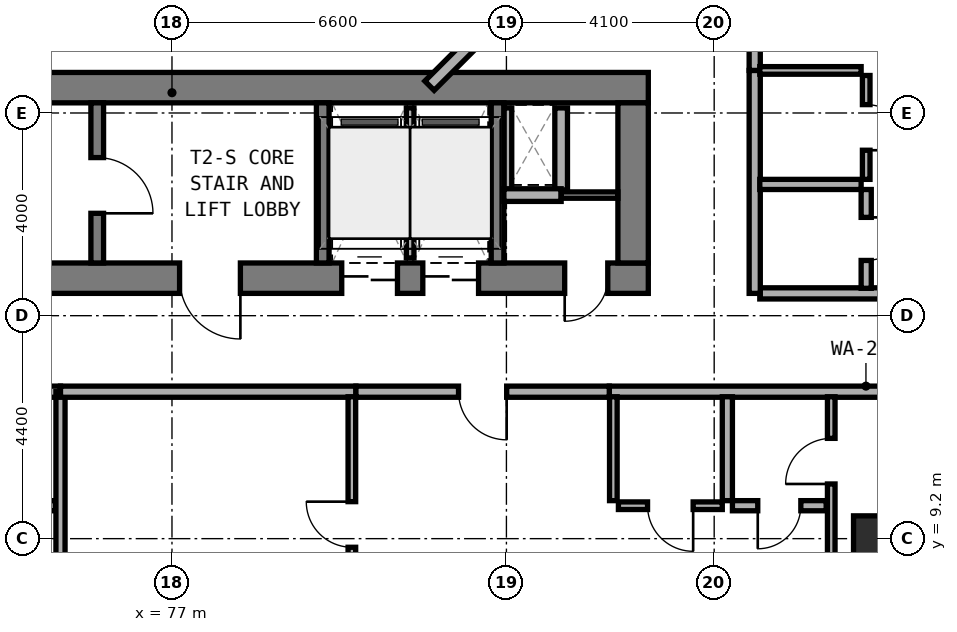
"""IFC4 building model, lengths in metres.
Left out: names, types, materials, properties, quantities, classifications, styles, units other than length and angle.
Written with IfcOpenShell. Run it as: python <this file> out.ifc"""

import sys

from ifc_helpers import new_model, si_unit, direction, frame, frame_2d, origin, origin_2d, place, context, subcontext, project, spatial, rectangle, extrude, element, fill, save


model = new_model("IFC4")
c1 = context("Model", 3, precision=1e-05, world=origin(), true_north=direction((0.0, 1.0)))
c2 = subcontext(c1, "Body", "Model", "MODEL_VIEW")
j1 = project(units=[si_unit("LENGTHUNIT", "METRE"), si_unit("PLANEANGLEUNIT", "RADIAN")], contexts=[c1])
p1 = place(None, origin())
s1 = spatial("IfcSite", under=j1, at=p1, CompositionType="ELEMENT")
p2 = place(p1, origin())
s2 = spatial("IfcBuilding", under=s1, at=p2, CompositionType="ELEMENT")
p3 = place(p2, frame((0.0, 0.0, 31.0)))
s3 = spatial("IfcBuildingStorey", under=s2, at=p3, CompositionType="ELEMENT", Elevation=31.0)
p4 = place(p3, frame((67.8, 14.34, 0.0), z_axis=(0.0, 0.0, 1.0), x_axis=(1.0, 0.0, 0.0)))
e1 = element("IfcWall", 1, at=p4, inside=s3, PredefinedType="SHEAR", context=c2, shape_type="SweptSolid", body=[
    extrude(rectangle(XDim=18.6, YDim=0.6, at=frame_2d((9.3, 0.0))), origin(), (0.0, 0.0, 1.0), 3.5),
])
p5 = place(p4, frame((9.35, 0.0, 0.0)))
e2 = element("IfcOpeningElement", 2, at=p5, cuts=e1, PredefinedType="OPENING", context=c2, shape_type="SweptSolid", body=[
    extrude(rectangle(XDim=1.2, YDim=2.15, at=frame_2d((0.6, 1.075))), frame((0.0, 0.31, 0.0), z_axis=(0.0, -1.0, 0.0), x_axis=(1.0, 0.0, 0.0)), (0.0, 0.0, 1.0), 0.62),
])
p6 = place(p4, frame((16.95, 0.0, 0.0)))
e3 = element("IfcOpeningElement", 3, at=p6, cuts=e1, PredefinedType="OPENING", context=c2, shape_type="SweptSolid", body=[
    extrude(rectangle(XDim=0.85, YDim=2.1, at=frame_2d((0.425, 1.05))), frame((0.0, 0.31, 0.0), z_axis=(0.0, -1.0, 0.0), x_axis=(1.0, 0.0, 0.0)), (0.0, 0.0, 1.0), 0.62),
])
p7 = place(p4, frame((12.55, 0.0, 0.0)))
e4 = element("IfcOpeningElement", 4, at=p7, cuts=e1, PredefinedType="OPENING", context=c2, shape_type="SweptSolid", body=[
    extrude(rectangle(XDim=1.1, YDim=2.15, at=frame_2d((0.55, 1.075))), frame((0.0, 0.31, 0.0), z_axis=(0.0, -1.0, 0.0), x_axis=(1.0, 0.0, 0.0)), (0.0, 0.0, 1.0), 0.62),
])
p8 = place(p4, frame((14.15, 0.0, 0.0)))
e5 = element("IfcOpeningElement", 5, at=p8, cuts=e1, PredefinedType="OPENING", context=c2, shape_type="SweptSolid", body=[
    extrude(rectangle(XDim=1.1, YDim=2.15, at=frame_2d((0.55, 1.075))), frame((0.0, 0.31, 0.0), z_axis=(0.0, -1.0, 0.0), x_axis=(1.0, 0.0, 0.0)), (0.0, 0.0, 1.0), 0.62),
])
p9 = place(p3, frame((67.8, 18.1, 0.0), z_axis=(0.0, 0.0, 1.0), x_axis=(1.0, 0.0, 0.0)))
e6 = element("IfcWall", 6, at=p9, inside=s3, PredefinedType="SHEAR", context=c2, shape_type="SweptSolid", body=[
    extrude(rectangle(XDim=18.6, YDim=0.6, at=frame_2d((9.3, 0.0))), origin(), (0.0, 0.0, 1.0), 3.5),
])
p10 = place(p3, frame((86.1, 14.64, 0.0), z_axis=(0.0, 0.0, 1.0), x_axis=(0.0, 1.0, 0.0)))
e7 = element("IfcWall", 7, at=p10, inside=s3, PredefinedType="SHEAR", context=c2, shape_type="SweptSolid", body=[
    extrude(rectangle(XDim=3.16, YDim=0.6, at=frame_2d((1.58, 0.0))), origin(), (0.0, 0.0, 1.0), 3.5),
])
p11 = place(p3, frame((75.525, 14.64, 0.0), z_axis=(0.0, 0.0, 1.0), x_axis=(0.0, 1.0, 0.0)))
e8 = element("IfcWall", 8, at=p11, inside=s3, PredefinedType="STANDARD", context=c2, shape_type="SweptSolid", body=[
    extrude(rectangle(XDim=3.16, YDim=0.25, at=frame_2d((1.58, 0.0))), origin(), (0.0, 0.0, 1.0), 3.25),
])
p12 = place(p11, frame((0.98, 0.0, 0.0)))
e9 = element("IfcOpeningElement", 9, at=p12, cuts=e8, PredefinedType="OPENING", context=c2, shape_type="SweptSolid", body=[
    extrude(rectangle(XDim=1.1, YDim=2.15, at=frame_2d((0.55, 1.075))), frame((0.0, 0.135, 0.0), z_axis=(0.0, -1.0, 0.0), x_axis=(1.0, 0.0, 0.0)), (0.0, 0.0, 1.0), 0.27),
])
for number, where, z_axis, x_axis in (
    (10, (79.975, 14.64, 0.0), (0.0, 0.0, 1.0), (0.0, 1.0, 0.0)),
    (11, (83.425, 14.64, 0.0), (0.0, 0.0, 1.0), (0.0, 1.0, 0.0)),
):
    element("IfcWall", number, at=place(p3, frame(where, z_axis=z_axis, x_axis=x_axis)), inside=s3, PredefinedType="STANDARD", context=c2, shape_type="SweptSolid", body=[
        extrude(rectangle(XDim=3.16, YDim=0.25, at=frame_2d((1.58, 0.0))), origin(), (0.0, 0.0, 1.0), 3.25),
    ])
p13 = place(p3, frame((91.0, 9.0, 0.0), z_axis=(0.0, 0.0, 1.0), x_axis=(1.0, 0.0, 0.0)))
e12 = element("IfcColumn", 12, at=p13, inside=s3, PredefinedType="COLUMN", context=c2, shape_type="SweptSolid", body=[
    extrude(rectangle(XDim=1.1, YDim=1.3, at=origin_2d()), origin(), (0.0, 0.0, 1.0), 3.5),
])
p14 = place(p3, frame((82.082, 18.138, 0.0), z_axis=(0.0, 0.0, 1.0), x_axis=(0.707106781187, 0.707106781187, 0.0)))
e13 = element("IfcWall", 13, at=p14, inside=s3, PredefinedType="STANDARD", context=c2, shape_type="SweptSolid", body=[
    extrude(rectangle(XDim=2.311, YDim=0.26, at=frame_2d((1.155, 0.0))), origin(), (0.0, 0.0, 1.0), 3.25),
])
p15 = place(p3, frame((83.63, 16.08, 0.0), z_axis=(0.0, 0.0, 1.0), x_axis=(0.0, 1.0, 0.0)))
e14 = element("IfcWall", 14, at=p15, inside=s3, PredefinedType="PARTITIONING", context=c2, shape_type="SweptSolid", body=[
    extrude(rectangle(XDim=1.62, YDim=0.15, at=frame_2d((0.81, 0.0))), origin(), (0.0, 0.0, 1.0), 2.725),
])
p16 = place(p3, frame((84.68, 16.08, 0.0), z_axis=(0.0, 0.0, 1.0), x_axis=(0.0, 1.0, 0.0)))
e15 = element("IfcWall", 15, at=p16, inside=s3, PredefinedType="SOLIDWALL", context=c2, shape_type="SweptSolid", body=[
    extrude(rectangle(XDim=1.62, YDim=0.25, at=frame_2d((0.81, 0.0))), origin(), (0.0, 0.0, 1.0), 3.22),
])
p17 = place(p3, frame((83.55, 15.98, 0.0), z_axis=(0.0, 0.0, 1.0), x_axis=(1.0, 0.0, 0.0)))
e16 = element("IfcWall", 16, at=p17, inside=s3, PredefinedType="SOLIDWALL", context=c2, shape_type="SweptSolid", body=[
    extrude(rectangle(XDim=1.13, YDim=0.25, at=frame_2d((0.565, 0.0))), origin(), (0.0, 0.0, 1.0), 3.22),
])
p18 = place(p3, frame((84.68, 15.98, 0.0), z_axis=(0.0, 0.0, 1.0), x_axis=(1.0, 0.0, 0.0)))
e17 = element("IfcWall", 17, at=p18, inside=s3, PredefinedType="PARTITIONING", context=c2, shape_type="SweptSolid", body=[
    extrude(rectangle(XDim=1.12, YDim=0.125, at=frame_2d((0.56, 0.0))), origin(), (0.0, 0.0, 1.0), 3.22),
])
p19 = place(p3, frame((81.7, 14.74, 0.0), z_axis=(0.0, 0.0, 1.0), x_axis=(0.0, 1.0, 0.0)))
e18 = element("IfcWall", 18, at=p19, inside=s3, PredefinedType="PARTITIONING", context=c2, shape_type="SweptSolid", body=[
    extrude(rectangle(XDim=2.96, YDim=0.15, at=frame_2d((1.48, 0.0))), origin(), (0.0, 0.0, 1.0), 3.22),
])
p20 = place(p3, frame((70.42, 12.1, 0.0), z_axis=(0.0, 0.0, 1.0), x_axis=(1.0, 0.0, 0.0)))
e19 = element("IfcWall", 19, at=p20, inside=s3, PredefinedType="SOLIDWALL", context=c2, shape_type="SweptSolid", body=[
    extrude(rectangle(XDim=4.38, YDim=0.22, at=frame_2d((2.19, 0.0))), origin(), (0.0, 0.0, 1.0), 2.725),
])
p21 = place(p3, frame((72.85, 9.85, 0.0), z_axis=(0.0, 0.0, 1.0), x_axis=(1.0, 0.0, 0.0)))
e20 = element("IfcWall", 20, at=p21, inside=s3, PredefinedType="PLUMBINGWALL", context=c2, shape_type="SweptSolid", body=[
    extrude(rectangle(XDim=1.85, YDim=0.2, at=frame_2d((0.925, 0.0))), origin(), (0.0, 0.0, 1.0), 3.22),
])
p22 = place(p21, frame((0.5, 0.0, 0.0)))
e21 = element("IfcOpeningElement", 21, at=p22, cuts=e20, PredefinedType="OPENING", context=c2, shape_type="SweptSolid", body=[
    extrude(rectangle(XDim=0.85, YDim=2.1, at=frame_2d((0.425, 1.05))), frame((0.0, 0.11, 0.0), z_axis=(0.0, -1.0, 0.0), x_axis=(1.0, 0.0, 0.0)), (0.0, 0.0, 1.0), 0.22),
])
p23 = place(p3, frame((74.8, 5.06, 0.0), z_axis=(0.0, 0.0, 1.0), x_axis=(0.0, 1.0, 0.0)))
e22 = element("IfcWall", 22, at=p23, inside=s3, PredefinedType="SOLIDWALL", context=c2, shape_type="SweptSolid", body=[
    extrude(rectangle(XDim=7.04, YDim=0.18, at=frame_2d((3.52, 0.0))), origin(), (0.0, 0.0, 1.0), 2.825),
])
p24 = place(p3, frame((74.8, 12.1, 0.0), z_axis=(0.0, 0.0, 1.0), x_axis=(1.0, 0.0, 0.0)))
e23 = element("IfcWall", 23, at=p24, inside=s3, PredefinedType="SOLIDWALL", context=c2, shape_type="SweptSolid", body=[
    extrude(rectangle(XDim=5.83, YDim=0.22, at=frame_2d((2.915, 0.0))), origin(), (0.0, 0.0, 1.0), 3.22),
])
p25 = place(p3, frame((85.63, 12.1, 0.0), z_axis=(0.0, 0.0, 1.0), x_axis=(1.0, 0.0, 0.0)))
e24 = element("IfcWall", 24, at=p25, inside=s3, PredefinedType="SOLIDWALL", context=c2, shape_type="SweptSolid", body=[
    extrude(rectangle(XDim=10.13, YDim=0.22, at=frame_2d((5.065, 0.0))), origin(), (0.0, 0.0, 1.0), 2.865),
])
p26 = place(p3, frame((80.63, 12.1, 0.0), z_axis=(0.0, 0.0, 1.0), x_axis=(1.0, 0.0, 0.0)))
e25 = element("IfcWall", 25, at=p26, inside=s3, PredefinedType="SOLIDWALL", context=c2, shape_type="SweptSolid", body=[
    extrude(rectangle(XDim=5.0, YDim=0.22, at=frame_2d((2.5, 0.0))), origin(), (0.0, 0.0, 1.0), 2.725),
])
p27 = place(p26, frame((2.025, 0.0, 0.0)))
e26 = element("IfcOpeningElement", 26, at=p27, cuts=e25, PredefinedType="OPENING", context=c2, shape_type="SweptSolid", body=[
    extrude(rectangle(XDim=0.95, YDim=2.1, at=frame_2d((0.475, 1.05))), frame((0.0, 0.12, 0.0), z_axis=(0.0, -1.0, 0.0), x_axis=(1.0, 0.0, 0.0)), (0.0, 0.0, 1.0), 0.24),
])
p28 = place(p3, frame((80.55, 5.16, 0.0), z_axis=(0.0, 0.0, 1.0), x_axis=(0.0, 1.0, 0.0)))
e27 = element("IfcWall", 27, at=p28, inside=s3, PredefinedType="PARTITIONING", context=c2, shape_type="SweptSolid", body=[
    extrude(rectangle(XDim=6.84, YDim=0.15, at=frame_2d((3.42, 0.0))), origin(), (0.0, 0.0, 1.0), 2.825),
])
p29 = place(p28, frame((3.87, 0.0, 0.0)))
e28 = element("IfcOpeningElement", 28, at=p29, cuts=e27, PredefinedType="OPENING", context=c2, shape_type="SweptSolid", body=[
    extrude(rectangle(XDim=0.9, YDim=2.1, at=frame_2d((0.45, 1.05))), frame((0.0, 0.085, 0.0), z_axis=(0.0, -1.0, 0.0), x_axis=(1.0, 0.0, 0.0)), (0.0, 0.0, 1.0), 0.17),
])
p30 = place(p3, frame((90.01, 6.689, 0.0), z_axis=(0.0, 0.0, 1.0), x_axis=(0.0, 1.0, 0.0)))
e29 = element("IfcWall", 29, at=p30, inside=s3, PredefinedType="PARTITIONING", context=c2, shape_type="SweptSolid", body=[
    extrude(rectangle(XDim=5.311, YDim=0.15, at=frame_2d((2.656, 0.0))), origin(), (0.0, 0.0, 1.0), 2.865),
])
p31 = place(p30, frame((3.59, 0.0, 0.0)))
e30 = element("IfcOpeningElement", 30, at=p31, cuts=e29, PredefinedType="OPENING", context=c2, shape_type="SweptSolid", body=[
    extrude(rectangle(XDim=0.9, YDim=2.1, at=frame_2d((0.45, 1.05))), frame((0.0, 0.085, 0.0), z_axis=(0.0, -1.0, 0.0), x_axis=(1.0, 0.0, 0.0)), (0.0, 0.0, 1.0), 0.17),
])
p32 = place(p3, frame((87.96, 9.95, 0.0), z_axis=(0.0, 0.0, 1.0), x_axis=(0.0, 1.0, 0.0)))
e31 = element("IfcWall", 31, at=p32, inside=s3, PredefinedType="PLUMBINGWALL", context=c2, shape_type="SweptSolid", body=[
    extrude(rectangle(XDim=2.05, YDim=0.2, at=frame_2d((1.025, 0.0))), origin(), (0.0, 0.0, 1.0), 3.22),
])
p33 = place(p3, frame((85.71, 9.95, 0.0), z_axis=(0.0, 0.0, 1.0), x_axis=(0.0, 1.0, 0.0)))
e32 = element("IfcWall", 32, at=p33, inside=s3, PredefinedType="PARTITIONING", context=c2, shape_type="SweptSolid", body=[
    extrude(rectangle(XDim=2.05, YDim=0.15, at=frame_2d((1.025, 0.0))), origin(), (0.0, 0.0, 1.0), 3.22),
])
p34 = place(p3, frame((88.06, 9.85, 0.0), z_axis=(0.0, 0.0, 1.0), x_axis=(1.0, 0.0, 0.0)))
e33 = element("IfcWall", 33, at=p34, inside=s3, PredefinedType="PLUMBINGWALL", context=c2, shape_type="SweptSolid", body=[
    extrude(rectangle(XDim=1.85, YDim=0.2, at=frame_2d((0.925, 0.0))), origin(), (0.0, 0.0, 1.0), 3.22),
])
p35 = place(p34, frame((0.5, 0.0, 0.0)))
e34 = element("IfcOpeningElement", 34, at=p35, cuts=e33, PredefinedType="OPENING", context=c2, shape_type="SweptSolid", body=[
    extrude(rectangle(XDim=0.85, YDim=2.1, at=frame_2d((0.425, 1.05))), frame((0.0, 0.11, 0.0), z_axis=(0.0, -1.0, 0.0), x_axis=(1.0, 0.0, 0.0)), (0.0, 0.0, 1.0), 0.22),
])
p36 = place(p3, frame((85.81, 9.85, 0.0), z_axis=(0.0, 0.0, 1.0), x_axis=(1.0, 0.0, 0.0)))
e35 = element("IfcWall", 35, at=p36, inside=s3, PredefinedType="PARTITIONING", context=c2, shape_type="SweptSolid", body=[
    extrude(rectangle(XDim=2.05, YDim=0.15, at=frame_2d((1.025, 0.0))), origin(), (0.0, 0.0, 1.0), 3.22),
])
p37 = place(p36, frame((0.575, 0.0, 0.0)))
e36 = element("IfcOpeningElement", 36, at=p37, cuts=e35, PredefinedType="OPENING", context=c2, shape_type="SweptSolid", body=[
    extrude(rectangle(XDim=0.9, YDim=2.1, at=frame_2d((0.45, 1.05))), frame((0.0, 0.085, 0.0), z_axis=(0.0, -1.0, 0.0), x_axis=(1.0, 0.0, 0.0)), (0.0, 0.0, 1.0), 0.17),
])
p38 = place(p3, frame((88.6, 14.04, 0.0), z_axis=(0.0, 0.0, 1.0), x_axis=(1.0, 0.0, 0.0)))
e37 = element("IfcWall", 37, at=p38, inside=s3, PredefinedType="SOLIDWALL", context=c2, shape_type="SweptSolid", body=[
    extrude(rectangle(XDim=7.0, YDim=0.22, at=frame_2d((3.5, 0.0))), origin(), (0.0, 0.0, 1.0), 2.865),
])
p39 = place(p3, frame((88.5, 14.04, 0.0), z_axis=(0.0, 0.0, 1.0), x_axis=(0.0, 1.0, 0.0)))
e38 = element("IfcWall", 38, at=p39, inside=s3, PredefinedType="SOLIDWALL", context=c2, shape_type="SweptSolid", body=[
    extrude(rectangle(XDim=4.4, YDim=0.22, at=frame_2d((2.2, 0.0))), origin(), (0.0, 0.0, 1.0), 3.22),
])
p40 = place(p3, frame((88.5, 18.44, 0.0), z_axis=(0.0, 0.0, 1.0), x_axis=(0.0, 1.0, 0.0)))
e39 = element("IfcWall", 39, at=p40, inside=s3, PredefinedType="SOLIDWALL", context=c2, shape_type="SweptSolid", body=[
    extrude(rectangle(XDim=6.56, YDim=0.22, at=frame_2d((3.28, 0.0))), origin(), (0.0, 0.0, 1.0), 2.725),
])
p41 = place(p40, frame((0.905, 0.0, 0.0)))
e40 = element("IfcOpeningElement", 40, at=p41, cuts=e39, PredefinedType="OPENING", context=c2, shape_type="SweptSolid", body=[
    extrude(rectangle(XDim=0.95, YDim=2.1, at=frame_2d((0.475, 1.05))), frame((0.0, 0.12, 0.0), z_axis=(0.0, -1.0, 0.0), x_axis=(1.0, 0.0, 0.0)), (0.0, 0.0, 1.0), 0.24),
])
p42 = place(p3, frame((88.6, 16.19, 0.0), z_axis=(0.0, 0.0, 1.0), x_axis=(1.0, 0.0, 0.0)))
e41 = element("IfcWall", 41, at=p42, inside=s3, PredefinedType="PLUMBINGWALL", context=c2, shape_type="SweptSolid", body=[
    extrude(rectangle(XDim=2.0, YDim=0.2, at=frame_2d((1.0, 0.0))), origin(), (0.0, 0.0, 1.0), 3.22),
])
p43 = place(p3, frame((88.6, 18.44, 0.0), z_axis=(0.0, 0.0, 1.0), x_axis=(1.0, 0.0, 0.0)))
e42 = element("IfcWall", 42, at=p43, inside=s3, PredefinedType="PARTITIONING", context=c2, shape_type="SweptSolid", body=[
    extrude(rectangle(XDim=2.0, YDim=0.15, at=frame_2d((1.0, 0.0))), origin(), (0.0, 0.0, 1.0), 3.22),
])
p44 = place(p3, frame((90.7, 14.14, 0.0), z_axis=(0.0, 0.0, 1.0), x_axis=(0.0, 1.0, 0.0)))
e43 = element("IfcWall", 43, at=p44, inside=s3, PredefinedType="PLUMBINGWALL", context=c2, shape_type="SweptSolid", body=[
    extrude(rectangle(XDim=1.95, YDim=0.2, at=frame_2d((0.975, 0.0))), origin(), (0.0, 0.0, 1.0), 3.22),
])
p45 = place(p44, frame((0.55, 0.0, 0.0)))
e44 = element("IfcOpeningElement", 44, at=p45, cuts=e43, PredefinedType="OPENING", context=c2, shape_type="SweptSolid", body=[
    extrude(rectangle(XDim=0.85, YDim=2.1, at=frame_2d((0.425, 1.05))), frame((0.0, 0.11, 0.0), z_axis=(0.0, -1.0, 0.0), x_axis=(1.0, 0.0, 0.0)), (0.0, 0.0, 1.0), 0.22),
])
p46 = place(p3, frame((90.7, 16.29, 0.0), z_axis=(0.0, 0.0, 1.0), x_axis=(0.0, 1.0, 0.0)))
e45 = element("IfcWall", 45, at=p46, inside=s3, PredefinedType="PARTITIONING", context=c2, shape_type="SweptSolid", body=[
    extrude(rectangle(XDim=2.05, YDim=0.15, at=frame_2d((1.025, 0.0))), origin(), (0.0, 0.0, 1.0), 3.22),
])
p47 = place(p46, frame((0.575, 0.0, 0.0)))
e46 = element("IfcOpeningElement", 46, at=p47, cuts=e45, PredefinedType="OPENING", context=c2, shape_type="SweptSolid", body=[
    extrude(rectangle(XDim=0.9, YDim=2.1, at=frame_2d((0.45, 1.05))), frame((0.0, 0.085, 0.0), z_axis=(0.0, -1.0, 0.0), x_axis=(1.0, 0.0, 0.0)), (0.0, 0.0, 1.0), 0.17),
])
p48 = place(p12, frame((1.1, 0.0, 0.0), z_axis=(0.0, 0.0, 1.0), x_axis=(-1.0, 0.0, 0.0)))
e47 = element("IfcDoor", 47, at=p48, inside=s3, OperationType="SINGLE_SWING_RIGHT", PredefinedType="DOOR", context=c2, shape_type="SweptSolid", body=[
    extrude(rectangle(XDim=1.1, YDim=2.15, at=frame_2d((0.55, 1.075))), frame((0.0, 0.025, 0.0), z_axis=(0.0, -1.0, 0.0), x_axis=(1.0, 0.0, 0.0)), (0.0, 0.0, 1.0), 0.05),
])
fill(e9, e47)
p49 = place(p5, frame((1.2, 0.0, 0.0), z_axis=(0.0, 0.0, 1.0), x_axis=(-1.0, 0.0, 0.0)))
e48 = element("IfcDoor", 48, at=p49, inside=s3, OperationType="SINGLE_SWING_LEFT", PredefinedType="DOOR", context=c2, shape_type="SweptSolid", body=[
    extrude(rectangle(XDim=1.2, YDim=2.15, at=frame_2d((0.6, 1.075))), frame((0.0, 0.025, 0.0), z_axis=(0.0, -1.0, 0.0), x_axis=(1.0, 0.0, 0.0)), (0.0, 0.0, 1.0), 0.05),
])
fill(e2, e48)
p50 = place(p6, frame((0.85, 0.0, 0.0), z_axis=(0.0, 0.0, 1.0), x_axis=(-1.0, 0.0, 0.0)))
e49 = element("IfcDoor", 49, at=p50, inside=s3, OperationType="SINGLE_SWING_RIGHT", PredefinedType="DOOR", context=c2, shape_type="SweptSolid", body=[
    extrude(rectangle(XDim=0.85, YDim=2.1, at=frame_2d((0.425, 1.05))), frame((0.0, 0.025, 0.0), z_axis=(0.0, -1.0, 0.0), x_axis=(1.0, 0.0, 0.0)), (0.0, 0.0, 1.0), 0.05),
])
fill(e3, e49)
p51 = place(p7, frame((1.1, 0.0, 0.0), z_axis=(0.0, 0.0, 1.0), x_axis=(-1.0, 0.0, 0.0)))
e50 = element("IfcDoor", 50, at=p51, inside=s3, OperationType="DOUBLE_DOOR_SLIDING", PredefinedType="DOOR", context=c2, shape_type="SweptSolid", body=[
    extrude(rectangle(XDim=1.1, YDim=2.15, at=frame_2d((0.55, 1.075))), frame((0.0, 0.025, 0.0), z_axis=(0.0, -1.0, 0.0), x_axis=(1.0, 0.0, 0.0)), (0.0, 0.0, 1.0), 0.05),
])
fill(e4, e50)
p52 = place(p8, frame((1.1, 0.0, 0.0), z_axis=(0.0, 0.0, 1.0), x_axis=(-1.0, 0.0, 0.0)))
e51 = element("IfcDoor", 51, at=p52, inside=s3, OperationType="DOUBLE_DOOR_SLIDING", PredefinedType="DOOR", context=c2, shape_type="SweptSolid", body=[
    extrude(rectangle(XDim=1.1, YDim=2.15, at=frame_2d((0.55, 1.075))), frame((0.0, 0.025, 0.0), z_axis=(0.0, -1.0, 0.0), x_axis=(1.0, 0.0, 0.0)), (0.0, 0.0, 1.0), 0.05),
])
fill(e5, e51)
p53 = place(p27, frame((0.95, 0.0, 0.0), z_axis=(0.0, 0.0, 1.0), x_axis=(-1.0, 0.0, 0.0)))
e52 = element("IfcDoor", 52, at=p53, inside=s3, OperationType="SINGLE_SWING_LEFT", PredefinedType="DOOR", context=c2, shape_type="SweptSolid", body=[
    extrude(rectangle(XDim=0.95, YDim=2.1, at=frame_2d((0.475, 1.05))), frame((0.0, 0.025, 0.0), z_axis=(0.0, -1.0, 0.0), x_axis=(1.0, 0.0, 0.0)), (0.0, 0.0, 1.0), 0.05),
])
fill(e26, e52)
p54 = place(p29, origin())
e53 = element("IfcDoor", 53, at=p54, inside=s3, OperationType="SINGLE_SWING_RIGHT", PredefinedType="DOOR", context=c2, shape_type="SweptSolid", body=[
    extrude(rectangle(XDim=0.9, YDim=2.1, at=frame_2d((0.45, 1.05))), frame((0.0, 0.025, 0.0), z_axis=(0.0, -1.0, 0.0), x_axis=(1.0, 0.0, 0.0)), (0.0, 0.0, 1.0), 0.05),
])
fill(e28, e53)
p55 = place(p31, origin())
e54 = element("IfcDoor", 54, at=p55, inside=s3, OperationType="SINGLE_SWING_LEFT", PredefinedType="DOOR", context=c2, shape_type="SweptSolid", body=[
    extrude(rectangle(XDim=0.9, YDim=2.1, at=frame_2d((0.45, 1.05))), frame((0.0, 0.025, 0.0), z_axis=(0.0, -1.0, 0.0), x_axis=(1.0, 0.0, 0.0)), (0.0, 0.0, 1.0), 0.05),
])
fill(e30, e54)
p56 = place(p35, frame((0.85, 0.0, 0.0), z_axis=(0.0, 0.0, 1.0), x_axis=(-1.0, 0.0, 0.0)))
e55 = element("IfcDoor", 55, at=p56, inside=s3, OperationType="SINGLE_SWING_RIGHT", PredefinedType="DOOR", context=c2, shape_type="SweptSolid", body=[
    extrude(rectangle(XDim=0.85, YDim=2.1, at=frame_2d((0.425, 1.05))), frame((0.0, 0.025, 0.0), z_axis=(0.0, -1.0, 0.0), x_axis=(1.0, 0.0, 0.0)), (0.0, 0.0, 1.0), 0.05),
])
fill(e34, e55)
p57 = place(p37, frame((0.9, 0.0, 0.0), z_axis=(0.0, 0.0, 1.0), x_axis=(-1.0, 0.0, 0.0)))
e56 = element("IfcDoor", 56, at=p57, inside=s3, OperationType="SINGLE_SWING_LEFT", PredefinedType="DOOR", context=c2, shape_type="SweptSolid", body=[
    extrude(rectangle(XDim=0.9, YDim=2.1, at=frame_2d((0.45, 1.05))), frame((0.0, 0.025, 0.0), z_axis=(0.0, -1.0, 0.0), x_axis=(1.0, 0.0, 0.0)), (0.0, 0.0, 1.0), 0.05),
])
fill(e36, e56)
p58 = place(p45, frame((0.85, 0.0, 0.0), z_axis=(0.0, 0.0, 1.0), x_axis=(-1.0, 0.0, 0.0)))
e57 = element("IfcDoor", 57, at=p58, inside=s3, OperationType="SINGLE_SWING_LEFT", PredefinedType="DOOR", context=c2, shape_type="SweptSolid", body=[
    extrude(rectangle(XDim=0.85, YDim=2.1, at=frame_2d((0.425, 1.05))), frame((0.0, 0.025, 0.0), z_axis=(0.0, -1.0, 0.0), x_axis=(1.0, 0.0, 0.0)), (0.0, 0.0, 1.0), 0.05),
])
fill(e44, e57)
p59 = place(p47, frame((0.9, 0.0, 0.0), z_axis=(0.0, 0.0, 1.0), x_axis=(-1.0, 0.0, 0.0)))
e58 = element("IfcDoor", 58, at=p59, inside=s3, OperationType="SINGLE_SWING_RIGHT", PredefinedType="DOOR", context=c2, shape_type="SweptSolid", body=[
    extrude(rectangle(XDim=0.9, YDim=2.1, at=frame_2d((0.45, 1.05))), frame((0.0, 0.025, 0.0), z_axis=(0.0, -1.0, 0.0), x_axis=(1.0, 0.0, 0.0)), (0.0, 0.0, 1.0), 0.05),
])
fill(e46, e58)
save(model, sys.argv[1])
